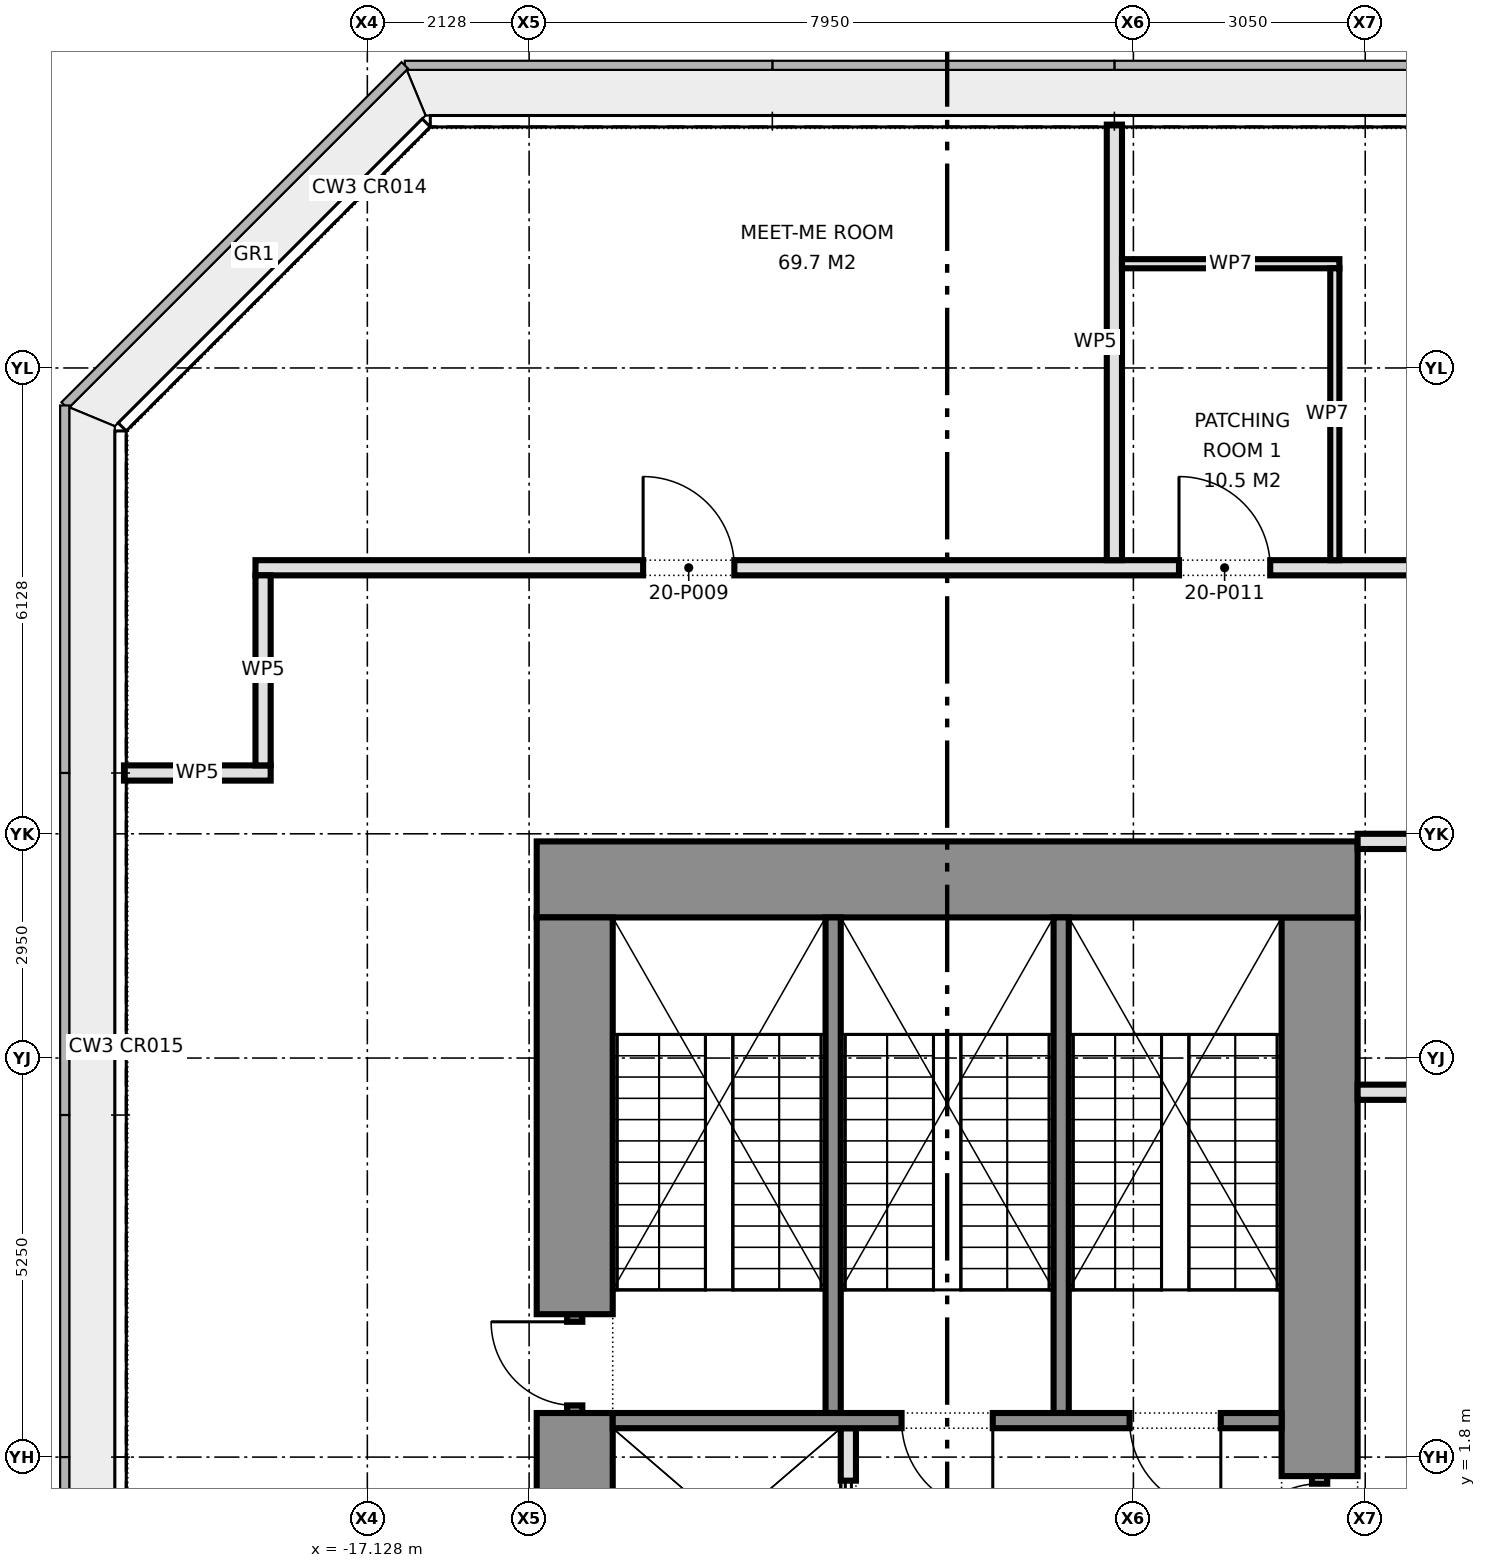
"""IFC4 building model, lengths in metres.
Left out: names, types, materials, properties, quantities, classifications, styles, units other than length and angle.
Written with IfcOpenShell. Run it as: python <this file> out.ifc"""

import sys

from ifc_helpers import new_model, si_unit, direction, frame, frame_2d, origin, place, context, subcontext, project, spatial, rectangle, extrude, element, fill, save


model = new_model("IFC4")
c1 = context("Model", 3, precision=1e-05, world=origin(), true_north=direction((0.0, 1.0)))
c2 = subcontext(c1, "Body", "Model", "MODEL_VIEW")
j1 = project(units=[si_unit("LENGTHUNIT", "METRE"), si_unit("PLANEANGLEUNIT", "RADIAN")], contexts=[c1])
p1 = place(None, origin())
s1 = spatial("IfcSite", under=j1, at=p1, CompositionType="ELEMENT")
p2 = place(p1, origin())
s2 = spatial("IfcBuilding", under=s1, at=p2, CompositionType="ELEMENT")
p3 = place(p2, frame((0.0, 0.0, 90.8)))
s3 = spatial("IfcBuildingStorey", under=s2, at=p3, CompositionType="ELEMENT", Elevation=90.8)
p4 = place(p3, frame((-14.9, 9.4, 0.0), z_axis=(0.0, 0.0, 1.0), x_axis=(1.0, 0.0, 0.0)))
e1 = element("IfcWall", 1, at=p4, inside=s3, PredefinedType="SHEAR", context=c2, shape_type="SweptSolid", body=[
    extrude(rectangle(XDim=10.8, YDim=1.0, at=frame_2d((5.4, 0.0))), origin(), (0.0, 0.0, 1.0), 4.2),
])
p5 = place(p3, frame((-14.4, -3.75, 0.0), z_axis=(0.0, 0.0, 1.0), x_axis=(0.0, 1.0, 0.0)))
e2 = element("IfcWall", 2, at=p5, inside=s3, PredefinedType="SHEAR", context=c2, shape_type="SweptSolid", body=[
    extrude(rectangle(XDim=6.13, YDim=1.0, at=frame_2d((3.065, 0.0))), origin(), (0.0, 0.0, 1.0), 4.2),
])
p6 = place(p3, frame((-14.4, 2.38, 0.0), z_axis=(0.0, 0.0, 1.0), x_axis=(0.0, 1.0, 0.0)))
e3 = element("IfcWall", 3, at=p6, inside=s3, PredefinedType="SHEAR", context=c2, shape_type="SweptSolid", body=[
    extrude(rectangle(XDim=1.3, YDim=0.2, at=frame_2d((0.65, 0.0))), origin(), (0.0, 0.0, 1.0), 2.4),
])
p7 = place(p6, frame((0.1, 0.0, 0.0)))
e4 = element("IfcOpeningElement", 4, at=p7, cuts=e3, PredefinedType="OPENING", context=c2, shape_type="SweptSolid", body=[
    extrude(rectangle(XDim=1.1, YDim=2.1, at=frame_2d((0.55, 1.05))), frame((0.0, 0.11, 0.0), z_axis=(0.0, -1.0, 0.0), x_axis=(1.0, 0.0, 0.0)), (0.0, 0.0, 1.0), 0.22),
])
p8 = place(p3, frame((-14.4, 3.68, 0.0), z_axis=(0.0, 0.0, 1.0), x_axis=(0.0, 1.0, 0.0)))
e5 = element("IfcWall", 5, at=p8, inside=s3, PredefinedType="SHEAR", context=c2, shape_type="SweptSolid", body=[
    extrude(rectangle(XDim=5.22, YDim=1.0, at=frame_2d((2.61, 0.0))), origin(), (0.0, 0.0, 1.0), 4.2),
])
p9 = place(p3, frame((-4.6, 0.25, 0.0), z_axis=(0.0, 0.0, 1.0), x_axis=(0.0, 1.0, 0.0)))
e6 = element("IfcWall", 6, at=p9, inside=s3, PredefinedType="PARTITIONING", context=c2, shape_type="SweptSolid", body=[
    extrude(rectangle(XDim=1.3, YDim=0.2, at=frame_2d((0.65, 0.0))), origin(), (0.0, 0.0, 1.0), 2.4),
])
p10 = place(p9, frame((0.1, 0.0, 0.0)))
e7 = element("IfcOpeningElement", 7, at=p10, cuts=e6, PredefinedType="OPENING", context=c2, shape_type="SweptSolid", body=[
    extrude(rectangle(XDim=1.1, YDim=2.1, at=frame_2d((0.55, 1.05))), frame((0.0, 0.11, 0.0), z_axis=(0.0, -1.0, 0.0), x_axis=(1.0, 0.0, 0.0)), (0.0, 0.0, 1.0), 0.22),
])
p11 = place(p3, frame((-4.6, 1.55, 0.0), z_axis=(0.0, 0.0, 1.0), x_axis=(0.0, 1.0, 0.0)))
e8 = element("IfcWall", 8, at=p11, inside=s3, PredefinedType="SHEAR", context=c2, shape_type="SweptSolid", body=[
    extrude(rectangle(XDim=7.35, YDim=1.0, at=frame_2d((3.675, 0.0))), origin(), (0.0, 0.0, 1.0), 4.2),
])
p12 = place(p3, frame((-10.8, -0.4, 0.0), z_axis=(0.0, 0.0, 1.0), x_axis=(0.0, 1.0, 0.0)))
e9 = element("IfcWall", 9, at=p12, inside=s3, PredefinedType="PARTITIONING", context=c2, shape_type="SweptSolid", body=[
    extrude(rectangle(XDim=2.58, YDim=0.2, at=frame_2d((1.29, 0.0))), origin(), (0.0, 0.0, 1.0), 4.2),
])
p13 = place(p12, frame((0.69, 0.0, 0.0)))
e10 = element("IfcOpeningElement", 10, at=p13, cuts=e9, PredefinedType="OPENING", context=c2, shape_type="SweptSolid", body=[
    extrude(rectangle(XDim=1.2, YDim=2.1, at=frame_2d((0.6, 1.05))), frame((0.0, 0.11, 0.0), z_axis=(0.0, -1.0, 0.0), x_axis=(1.0, 0.0, 0.0)), (0.0, 0.0, 1.0), 0.22),
])
p14 = place(p3, frame((-13.9, 2.28, 0.0), z_axis=(0.0, 0.0, 1.0), x_axis=(1.0, 0.0, 0.0)))
e11 = element("IfcWall", 11, at=p14, inside=s3, PredefinedType="SHEAR", context=c2, shape_type="SweptSolid", body=[
    extrude(rectangle(XDim=8.8, YDim=0.2, at=frame_2d((4.4, 0.0))), origin(), (0.0, 0.0, 1.0), 4.2),
])
p15 = place(p14, frame((3.8, 0.0, 0.0)))
e12 = element("IfcOpeningElement", 12, at=p15, cuts=e11, PredefinedType="OPENING", context=c2, shape_type="SweptSolid", body=[
    extrude(rectangle(XDim=1.2, YDim=2.1, at=frame_2d((0.6, 1.05))), frame((0.0, 0.11, 0.0), z_axis=(0.0, -1.0, 0.0), x_axis=(1.0, 0.0, 0.0)), (0.0, 0.0, 1.0), 0.22),
])
p16 = place(p14, frame((6.8, 0.0, 0.0)))
e13 = element("IfcOpeningElement", 13, at=p16, cuts=e11, PredefinedType="OPENING", context=c2, shape_type="SweptSolid", body=[
    extrude(rectangle(XDim=1.2, YDim=2.1, at=frame_2d((0.6, 1.05))), frame((0.0, 0.11, 0.0), z_axis=(0.0, -1.0, 0.0), x_axis=(1.0, 0.0, 0.0)), (0.0, 0.0, 1.0), 0.22),
])
for number, where, z_axis, x_axis in (
    (14, (-11.0, 2.38, 0.0), (0.0, 0.0, 1.0), (0.0, 1.0, 0.0)),
    (15, (-8.0, 2.38, 0.0), (0.0, 0.0, 1.0), (0.0, 1.0, 0.0)),
):
    element("IfcWall", number, at=place(p3, frame(where, z_axis=z_axis, x_axis=x_axis)), inside=s3, PredefinedType="SHEAR", context=c2, shape_type="SweptSolid", body=[
        extrude(rectangle(XDim=6.52, YDim=0.2, at=frame_2d((3.26, 0.0))), origin(), (0.0, 0.0, 1.0), 4.2),
    ])
p17 = place(p3, frame((-4.1, 6.6, 0.0), z_axis=(0.0, 0.0, 1.0), x_axis=(1.0, 0.0, 0.0)))
e16 = element("IfcWall", 16, at=p17, inside=s3, PredefinedType="PARTITIONING", context=c2, shape_type="SweptSolid", body=[
    extrude(rectangle(XDim=3.0, YDim=0.2, at=frame_2d((1.5, 0.0))), origin(), (0.0, 0.0, 1.0), 4.2),
])
p18 = place(p3, frame((-4.1, 9.9, 0.0), z_axis=(0.0, 0.0, 1.0), x_axis=(1.0, 0.0, 0.0)))
e17 = element("IfcWall", 17, at=p18, inside=s3, PredefinedType="PARTITIONING", context=c2, shape_type="SweptSolid", body=[
    extrude(rectangle(XDim=3.0, YDim=0.2, at=frame_2d((1.5, 0.0))), origin(), (0.0, 0.0, 1.0), 3.263),
])
p19 = place(p3, frame((-20.33, 10.8, 0.0), z_axis=(0.0, 0.0, 1.0), x_axis=(1.0, 0.0, 0.0)))
e18 = element("IfcWall", 18, at=p19, inside=s3, PredefinedType="PARTITIONING", context=c2, shape_type="SweptSolid", body=[
    extrude(rectangle(XDim=1.93, YDim=0.2, at=frame_2d((0.965, 0.0))), origin(), (0.0, 0.0, 1.0), 4.2),
])
p20 = place(p3, frame((-18.6, 13.5, 0.0), z_axis=(0.0, 0.0, 1.0), x_axis=(1.0, 0.0, 0.0)))
e19 = element("IfcWall", 19, at=p20, inside=s3, PredefinedType="PARTITIONING", context=c2, shape_type="SweptSolid", body=[
    extrude(rectangle(XDim=37.2, YDim=0.2, at=frame_2d((18.6, 0.0))), origin(), (0.0, 0.0, 1.0), 4.2),
])
p21 = place(p20, frame((5.1, 0.0, 0.0)))
e20 = element("IfcOpeningElement", 20, at=p21, cuts=e19, PredefinedType="OPENING", context=c2, shape_type="SweptSolid", body=[
    extrude(rectangle(XDim=1.2, YDim=2.1, at=frame_2d((0.6, 1.05))), frame((0.0, 0.11, 0.0), z_axis=(0.0, -1.0, 0.0), x_axis=(1.0, 0.0, 0.0)), (0.0, 0.0, 1.0), 0.22),
])
p22 = place(p20, frame((18.9, 0.0, 0.0)))
e21 = element("IfcOpeningElement", 21, at=p22, cuts=e19, PredefinedType="OPENING", context=c2, shape_type="SweptSolid", body=[
    extrude(rectangle(XDim=1.2, YDim=2.1, at=frame_2d((0.6, 1.05))), frame((0.0, 0.11, 0.0), z_axis=(0.0, -1.0, 0.0), x_axis=(1.0, 0.0, 0.0)), (0.0, 0.0, 1.0), 0.22),
])
p23 = place(p20, frame((12.15, 0.0, 0.0)))
e22 = element("IfcOpeningElement", 22, at=p23, cuts=e19, PredefinedType="OPENING", context=c2, shape_type="SweptSolid", body=[
    extrude(rectangle(XDim=1.2, YDim=2.1, at=frame_2d((0.6, 1.05))), frame((0.0, 0.11, 0.0), z_axis=(0.0, -1.0, 0.0), x_axis=(1.0, 0.0, 0.0)), (0.0, 0.0, 1.0), 0.22),
])
p24 = place(p20, frame((30.05, 0.0, 0.0)))
e23 = element("IfcOpeningElement", 23, at=p24, cuts=e19, PredefinedType="OPENING", context=c2, shape_type="SweptSolid", body=[
    extrude(rectangle(XDim=1.8, YDim=2.1, at=frame_2d((0.9, 1.05))), frame((0.0, 0.11, 0.0), z_axis=(0.0, -1.0, 0.0), x_axis=(1.0, 0.0, 0.0)), (0.0, 0.0, 1.0), 0.22),
])
p25 = place(p3, frame((-7.3, 13.6, 0.0), z_axis=(0.0, 0.0, 1.0), x_axis=(0.0, 1.0, 0.0)))
e24 = element("IfcWall", 24, at=p25, inside=s3, PredefinedType="PARTITIONING", context=c2, shape_type="SweptSolid", body=[
    extrude(rectangle(XDim=5.73, YDim=0.2, at=frame_2d((2.865, 0.0))), origin(), (0.0, 0.0, 1.0), 4.2),
])
p26 = place(p3, frame((-18.5, 10.9, 0.0), z_axis=(0.0, 0.0, 1.0), x_axis=(0.0, 1.0, 0.0)))
e25 = element("IfcWall", 25, at=p26, inside=s3, PredefinedType="PARTITIONING", context=c2, shape_type="SweptSolid", body=[
    extrude(rectangle(XDim=2.5, YDim=0.2, at=frame_2d((1.25, 0.0))), origin(), (0.0, 0.0, 1.0), 4.2),
])
p27 = place(p3, frame((-7.2, 17.5, 0.0), z_axis=(0.0, 0.0, 1.0), x_axis=(1.0, 0.0, 0.0)))
e26 = element("IfcWall", 26, at=p27, inside=s3, PredefinedType="PARTITIONING", context=c2, shape_type="SweptSolid", body=[
    extrude(rectangle(XDim=2.86, YDim=0.12, at=frame_2d((1.43, 0.0))), origin(), (0.0, 0.0, 1.0), 4.2),
])
p28 = place(p3, frame((-4.4, 13.6, 0.0), z_axis=(0.0, 0.0, 1.0), x_axis=(0.0, 1.0, 0.0)))
e27 = element("IfcWall", 27, at=p28, inside=s3, PredefinedType="PARTITIONING", context=c2, shape_type="SweptSolid", body=[
    extrude(rectangle(XDim=3.84, YDim=0.12, at=frame_2d((1.92, 0.0))), origin(), (0.0, 0.0, 1.0), 4.2),
])
p29 = place(p7, origin())
e28 = element("IfcDoor", 28, at=p29, inside=s3, OperationType="SINGLE_SWING_RIGHT", PredefinedType="DOOR", context=c2, shape_type="SweptSolid", body=[
    extrude(rectangle(XDim=1.1, YDim=2.1, at=frame_2d((0.55, 1.05))), frame((0.0, 0.025, 0.0), z_axis=(0.0, -1.0, 0.0), x_axis=(1.0, 0.0, 0.0)), (0.0, 0.0, 1.0), 0.05),
])
fill(e4, e28)
p30 = place(p10, origin())
e29 = element("IfcDoor", 29, at=p30, inside=s3, OperationType="SINGLE_SWING_LEFT", PredefinedType="DOOR", context=c2, shape_type="SweptSolid", body=[
    extrude(rectangle(XDim=1.1, YDim=2.1, at=frame_2d((0.55, 1.05))), frame((0.0, 0.025, 0.0), z_axis=(0.0, -1.0, 0.0), x_axis=(1.0, 0.0, 0.0)), (0.0, 0.0, 1.0), 0.05),
])
fill(e7, e29)
p31 = place(p13, origin())
e30 = element("IfcDoor", 30, at=p31, inside=s3, OperationType="DOUBLE_DOOR_SLIDING", PredefinedType="DOOR", context=c2, shape_type="SweptSolid", body=[
    extrude(rectangle(XDim=1.2, YDim=2.1, at=frame_2d((0.6, 1.05))), frame((0.0, 0.025, 0.0), z_axis=(0.0, -1.0, 0.0), x_axis=(1.0, 0.0, 0.0)), (0.0, 0.0, 1.0), 0.05),
])
fill(e10, e30)
p32 = place(p15, frame((1.2, 0.0, 0.0), z_axis=(0.0, 0.0, 1.0), x_axis=(-1.0, 0.0, 0.0)))
e31 = element("IfcDoor", 31, at=p32, inside=s3, OperationType="SINGLE_SWING_LEFT", PredefinedType="DOOR", context=c2, shape_type="SweptSolid", body=[
    extrude(rectangle(XDim=1.2, YDim=2.1, at=frame_2d((0.6, 1.05))), frame((0.0, 0.025, 0.0), z_axis=(0.0, -1.0, 0.0), x_axis=(1.0, 0.0, 0.0)), (0.0, 0.0, 1.0), 0.05),
])
fill(e12, e31)
p33 = place(p16, frame((1.2, 0.0, 0.0), z_axis=(0.0, 0.0, 1.0), x_axis=(-1.0, 0.0, 0.0)))
e32 = element("IfcDoor", 32, at=p33, inside=s3, OperationType="SINGLE_SWING_LEFT", PredefinedType="DOOR", context=c2, shape_type="SweptSolid", body=[
    extrude(rectangle(XDim=1.2, YDim=2.1, at=frame_2d((0.6, 1.05))), frame((0.0, 0.025, 0.0), z_axis=(0.0, -1.0, 0.0), x_axis=(1.0, 0.0, 0.0)), (0.0, 0.0, 1.0), 0.05),
])
fill(e13, e32)
p34 = place(p21, origin())
e33 = element("IfcDoor", 33, at=p34, inside=s3, OperationType="SINGLE_SWING_LEFT", PredefinedType="DOOR", context=c2, shape_type="SweptSolid", body=[
    extrude(rectangle(XDim=1.2, YDim=2.1, at=frame_2d((0.6, 1.05))), frame((0.0, 0.025, 0.0), z_axis=(0.0, -1.0, 0.0), x_axis=(1.0, 0.0, 0.0)), (0.0, 0.0, 1.0), 0.05),
])
fill(e20, e33)
p35 = place(p23, origin())
e34 = element("IfcDoor", 34, at=p35, inside=s3, OperationType="SINGLE_SWING_LEFT", PredefinedType="DOOR", context=c2, shape_type="SweptSolid", body=[
    extrude(rectangle(XDim=1.2, YDim=2.1, at=frame_2d((0.6, 1.05))), frame((0.0, 0.025, 0.0), z_axis=(0.0, -1.0, 0.0), x_axis=(1.0, 0.0, 0.0)), (0.0, 0.0, 1.0), 0.05),
])
fill(e22, e34)
save(model, sys.argv[1])
